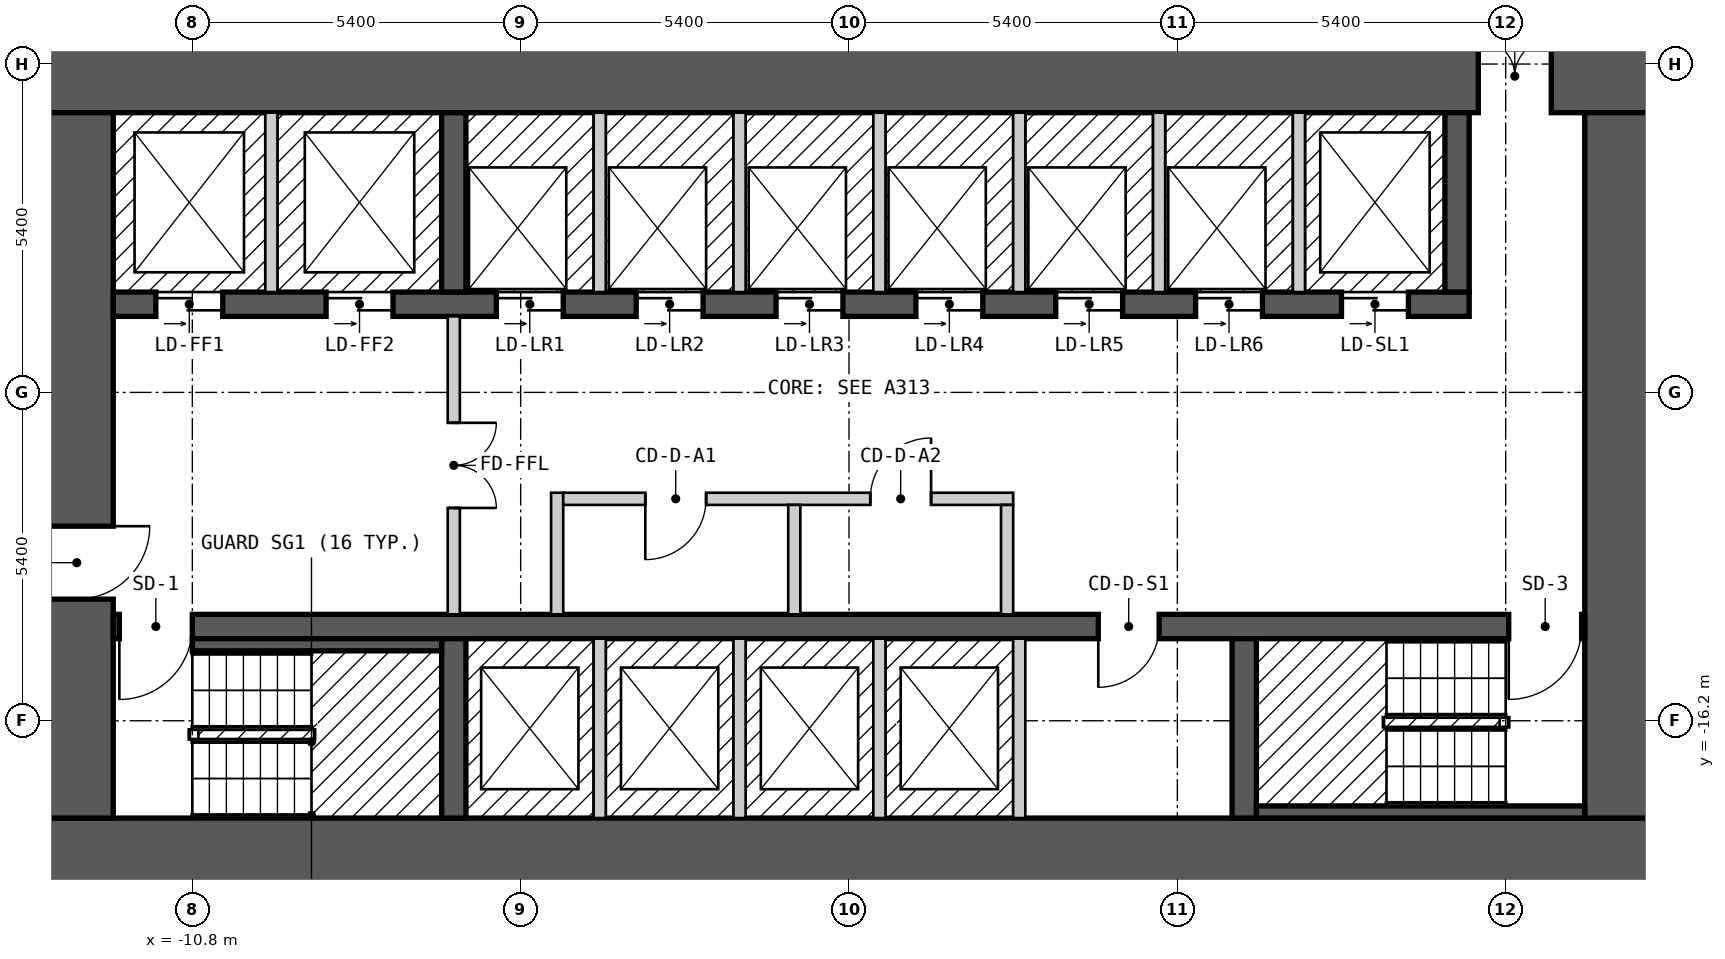
"""IFC4 building model, lengths in metres.
Left out: names, types, materials, properties, quantities, classifications, styles, units other than length and angle.
Written with IfcOpenShell. Run it as: python <this file> out.ifc"""

import sys

from ifc_helpers import new_model, si_unit, direction, frame, frame_2d, origin, place, context, subcontext, project, spatial, rectangle, extrude, element, fill, save


model = new_model("IFC4")
c1 = context("Model", 3, precision=1e-05, world=origin(), true_north=direction((0.0, 1.0)))
c2 = subcontext(c1, "Body", "Model", "MODEL_VIEW")
j1 = project(units=[si_unit("LENGTHUNIT", "METRE"), si_unit("PLANEANGLEUNIT", "RADIAN")], contexts=[c1])
p1 = place(None, origin())
s1 = spatial("IfcSite", under=j1, at=p1, CompositionType="ELEMENT")
p2 = place(p1, origin())
s2 = spatial("IfcBuilding", under=s1, at=p2, CompositionType="ELEMENT")
p3 = place(p2, frame((0.0, 0.0, 38.4)))
s3 = spatial("IfcBuildingStorey", under=s2, at=p3, CompositionType="ELEMENT", Elevation=38.4)
p4 = place(p3, frame((-13.3, -18.4, 0.0), z_axis=(0.0, 0.0, 1.0), x_axis=(1.0, 0.0, 0.0)))
e1 = element("IfcWall", 1, at=p4, inside=s3, PredefinedType="SHEAR", context=c2, shape_type="SweptSolid", body=[
    extrude(rectangle(XDim=26.6, YDim=1.2, at=frame_2d((13.3, 0.0))), origin(), (0.0, 0.0, 1.0), 2.7),
])
p5 = place(p3, frame((-13.3, -5.6, 0.0), z_axis=(0.0, 0.0, 1.0), x_axis=(1.0, 0.0, 0.0)))
e2 = element("IfcWall", 2, at=p5, inside=s3, PredefinedType="SHEAR", context=c2, shape_type="SweptSolid", body=[
    extrude(rectangle(XDim=26.6, YDim=1.2, at=frame_2d((13.3, 0.0))), origin(), (0.0, 0.0, 1.0), 2.7),
])
p6 = place(p5, frame((23.65, 0.0, 0.0)))
e3 = element("IfcOpeningElement", 3, at=p6, cuts=e2, PredefinedType="OPENING", context=c2, shape_type="SweptSolid", body=[
    extrude(rectangle(XDim=1.2, YDim=2.1, at=frame_2d((0.6, 1.05))), frame((0.0, 0.61, 0.0), z_axis=(0.0, -1.0, 0.0), x_axis=(1.0, 0.0, 0.0)), (0.0, 0.0, 1.0), 1.22),
])
p7 = place(p3, frame((-12.7, -17.8, 0.0), z_axis=(0.0, 0.0, 1.0), x_axis=(0.0, 1.0, 0.0)))
e4 = element("IfcWall", 4, at=p7, inside=s3, PredefinedType="SHEAR", context=c2, shape_type="SweptSolid", body=[
    extrude(rectangle(XDim=11.6, YDim=1.2, at=frame_2d((5.8, 0.0))), origin(), (0.0, 0.0, 1.0), 2.7),
])
p8 = place(p7, frame((3.6, 0.0, 0.0)))
e5 = element("IfcOpeningElement", 5, at=p8, cuts=e4, PredefinedType="OPENING", context=c2, shape_type="SweptSolid", body=[
    extrude(rectangle(XDim=1.2, YDim=2.1, at=frame_2d((0.6, 1.05))), frame((0.0, 0.61, 0.0), z_axis=(0.0, -1.0, 0.0), x_axis=(1.0, 0.0, 0.0)), (0.0, 0.0, 1.0), 1.22),
])
p9 = place(p3, frame((12.7, -17.8, 0.0), z_axis=(0.0, 0.0, 1.0), x_axis=(0.0, 1.0, 0.0)))
e6 = element("IfcWall", 6, at=p9, inside=s3, PredefinedType="SHEAR", context=c2, shape_type="SweptSolid", body=[
    extrude(rectangle(XDim=11.6, YDim=1.2, at=frame_2d((5.8, 0.0))), origin(), (0.0, 0.0, 1.0), 2.7),
])
p10 = place(p3, frame((-12.1, -14.65, 0.0), z_axis=(0.0, 0.0, 1.0), x_axis=(1.0, 0.0, 0.0)))
e7 = element("IfcWall", 7, at=p10, inside=s3, PredefinedType="SHEAR", context=c2, shape_type="SweptSolid", body=[
    extrude(rectangle(XDim=24.2, YDim=0.4, at=frame_2d((12.1, 0.0))), origin(), (0.0, 0.0, 1.0), 2.7),
])
p11 = place(p10, frame((1.3, 0.0, 0.0), z_axis=(0.0, 0.0, 1.0), x_axis=(-1.0, 0.0, 0.0)))
e8 = element("IfcOpeningElement", 8, at=p11, cuts=e7, PredefinedType="OPENING", context=c2, shape_type="SweptSolid", body=[
    extrude(rectangle(XDim=1.2, YDim=2.1, at=frame_2d((0.6, 1.05))), frame((0.0, 0.21, 0.0), z_axis=(0.0, -1.0, 0.0), x_axis=(1.0, 0.0, 0.0)), (0.0, 0.0, 1.0), 0.42),
])
p12 = place(p10, frame((24.15, 0.0, 0.0), z_axis=(0.0, 0.0, 1.0), x_axis=(-1.0, 0.0, 0.0)))
e9 = element("IfcOpeningElement", 9, at=p12, cuts=e7, PredefinedType="OPENING", context=c2, shape_type="SweptSolid", body=[
    extrude(rectangle(XDim=1.2, YDim=2.1, at=frame_2d((0.6, 1.05))), frame((0.0, 0.21, 0.0), z_axis=(0.0, -1.0, 0.0), x_axis=(1.0, 0.0, 0.0)), (0.0, 0.0, 1.0), 0.42),
])
p13 = place(p10, frame((17.2, 0.0, 0.0), z_axis=(0.0, 0.0, 1.0), x_axis=(-1.0, 0.0, 0.0)))
e10 = element("IfcOpeningElement", 10, at=p13, cuts=e7, PredefinedType="OPENING", context=c2, shape_type="SweptSolid", body=[
    extrude(rectangle(XDim=1.0, YDim=2.1, at=frame_2d((0.5, 1.05))), frame((0.0, 0.21, 0.0), z_axis=(0.0, -1.0, 0.0), x_axis=(1.0, 0.0, 0.0)), (0.0, 0.0, 1.0), 0.42),
])
p14 = place(p3, frame((-12.1, -9.35, 0.0), z_axis=(0.0, 0.0, 1.0), x_axis=(1.0, 0.0, 0.0)))
e11 = element("IfcWall", 11, at=p14, inside=s3, PredefinedType="SHEAR", context=c2, shape_type="SweptSolid", body=[
    extrude(rectangle(XDim=22.3, YDim=0.4, at=frame_2d((11.15, 0.0))), origin(), (0.0, 0.0, 1.0), 2.7),
])
p15 = place(p14, frame((0.7, 0.0, 0.0)))
e12 = element("IfcOpeningElement", 12, at=p15, cuts=e11, PredefinedType="OPENING", context=c2, shape_type="SweptSolid", body=[
    extrude(rectangle(XDim=1.1, YDim=2.1, at=frame_2d((0.55, 1.05))), frame((0.0, 0.21, 0.0), z_axis=(0.0, -1.0, 0.0), x_axis=(1.0, 0.0, 0.0)), (0.0, 0.0, 1.0), 0.42),
])
p16 = place(p14, frame((3.5, 0.0, 0.0)))
e13 = element("IfcOpeningElement", 13, at=p16, cuts=e11, PredefinedType="OPENING", context=c2, shape_type="SweptSolid", body=[
    extrude(rectangle(XDim=1.1, YDim=2.1, at=frame_2d((0.55, 1.05))), frame((0.0, 0.21, 0.0), z_axis=(0.0, -1.0, 0.0), x_axis=(1.0, 0.0, 0.0)), (0.0, 0.0, 1.0), 0.42),
])
p17 = place(p14, frame((6.3, 0.0, 0.0)))
e14 = element("IfcOpeningElement", 14, at=p17, cuts=e11, PredefinedType="OPENING", context=c2, shape_type="SweptSolid", body=[
    extrude(rectangle(XDim=1.1, YDim=2.1, at=frame_2d((0.55, 1.05))), frame((0.0, 0.21, 0.0), z_axis=(0.0, -1.0, 0.0), x_axis=(1.0, 0.0, 0.0)), (0.0, 0.0, 1.0), 0.42),
])
p18 = place(p14, frame((8.6, 0.0, 0.0)))
e15 = element("IfcOpeningElement", 15, at=p18, cuts=e11, PredefinedType="OPENING", context=c2, shape_type="SweptSolid", body=[
    extrude(rectangle(XDim=1.1, YDim=2.1, at=frame_2d((0.55, 1.05))), frame((0.0, 0.21, 0.0), z_axis=(0.0, -1.0, 0.0), x_axis=(1.0, 0.0, 0.0)), (0.0, 0.0, 1.0), 0.42),
])
p19 = place(p14, frame((10.9, 0.0, 0.0)))
e16 = element("IfcOpeningElement", 16, at=p19, cuts=e11, PredefinedType="OPENING", context=c2, shape_type="SweptSolid", body=[
    extrude(rectangle(XDim=1.1, YDim=2.1, at=frame_2d((0.55, 1.05))), frame((0.0, 0.21, 0.0), z_axis=(0.0, -1.0, 0.0), x_axis=(1.0, 0.0, 0.0)), (0.0, 0.0, 1.0), 0.42),
])
p20 = place(p14, frame((13.2, 0.0, 0.0)))
e17 = element("IfcOpeningElement", 17, at=p20, cuts=e11, PredefinedType="OPENING", context=c2, shape_type="SweptSolid", body=[
    extrude(rectangle(XDim=1.1, YDim=2.1, at=frame_2d((0.55, 1.05))), frame((0.0, 0.21, 0.0), z_axis=(0.0, -1.0, 0.0), x_axis=(1.0, 0.0, 0.0)), (0.0, 0.0, 1.0), 0.42),
])
p21 = place(p14, frame((15.5, 0.0, 0.0)))
e18 = element("IfcOpeningElement", 18, at=p21, cuts=e11, PredefinedType="OPENING", context=c2, shape_type="SweptSolid", body=[
    extrude(rectangle(XDim=1.1, YDim=2.1, at=frame_2d((0.55, 1.05))), frame((0.0, 0.21, 0.0), z_axis=(0.0, -1.0, 0.0), x_axis=(1.0, 0.0, 0.0)), (0.0, 0.0, 1.0), 0.42),
])
p22 = place(p14, frame((17.8, 0.0, 0.0)))
e19 = element("IfcOpeningElement", 19, at=p22, cuts=e11, PredefinedType="OPENING", context=c2, shape_type="SweptSolid", body=[
    extrude(rectangle(XDim=1.1, YDim=2.1, at=frame_2d((0.55, 1.05))), frame((0.0, 0.21, 0.0), z_axis=(0.0, -1.0, 0.0), x_axis=(1.0, 0.0, 0.0)), (0.0, 0.0, 1.0), 0.42),
])
p23 = place(p14, frame((20.2, 0.0, 0.0)))
e20 = element("IfcOpeningElement", 20, at=p23, cuts=e11, PredefinedType="OPENING", context=c2, shape_type="SweptSolid", body=[
    extrude(rectangle(XDim=1.1, YDim=2.1, at=frame_2d((0.55, 1.05))), frame((0.0, 0.21, 0.0), z_axis=(0.0, -1.0, 0.0), x_axis=(1.0, 0.0, 0.0)), (0.0, 0.0, 1.0), 0.42),
])
for number, where, z_axis, x_axis in (
    (21, (-6.5, -17.8, 0.0), (0.0, 0.0, 1.0), (0.0, 1.0, 0.0)),
    (22, (6.5, -17.8, 0.0), (0.0, 0.0, 1.0), (0.0, 1.0, 0.0)),
    (23, (-6.5, -9.15, 0.0), (0.0, 0.0, 1.0), (0.0, 1.0, 0.0)),
    (24, (10.0, -9.15, 0.0), (0.0, 0.0, 1.0), (0.0, 1.0, 0.0)),
):
    element("IfcWall", number, at=place(p3, frame(where, z_axis=z_axis, x_axis=x_axis)), inside=s3, PredefinedType="SHEAR", context=c2, shape_type="SweptSolid", body=[
        extrude(rectangle(XDim=2.95, YDim=0.4, at=frame_2d((1.475, 0.0))), origin(), (0.0, 0.0, 1.0), 2.7),
    ])
p24 = place(p3, frame((-10.8, -14.95, 0.0), z_axis=(0.0, 0.0, 1.0), x_axis=(1.0, 0.0, 0.0)))
e25 = element("IfcWall", 25, at=p24, inside=s3, PredefinedType="SOLIDWALL", context=c2, shape_type="SweptSolid", body=[
    extrude(rectangle(XDim=4.1, YDim=0.2, at=frame_2d((2.05, 0.0))), origin(), (0.0, 0.0, 1.0), 2.7),
])
p25 = place(p3, frame((-9.5, -9.15, 0.0), z_axis=(0.0, 0.0, 1.0), x_axis=(0.0, 1.0, 0.0)))
e26 = element("IfcWall", 26, at=p25, inside=s3, PredefinedType="SOLIDWALL", context=c2, shape_type="SweptSolid", body=[
    extrude(rectangle(XDim=2.95, YDim=0.2, at=frame_2d((1.475, 0.0))), origin(), (0.0, 0.0, 1.0), 2.7),
])
p26 = place(p3, frame((-6.5, -14.45, 0.0), z_axis=(0.0, 0.0, 1.0), x_axis=(0.0, 1.0, 0.0)))
e27 = element("IfcWall", 27, at=p26, inside=s3, PredefinedType="PARTITIONING", context=c2, shape_type="SweptSolid", body=[
    extrude(rectangle(XDim=4.9, YDim=0.2, at=frame_2d((2.45, 0.0))), origin(), (0.0, 0.0, 1.0), 2.7),
])
p27 = place(p26, frame((3.15, 0.0, 0.0), z_axis=(0.0, 0.0, 1.0), x_axis=(-1.0, 0.0, 0.0)))
e28 = element("IfcOpeningElement", 28, at=p27, cuts=e27, PredefinedType="OPENING", context=c2, shape_type="SweptSolid", body=[
    extrude(rectangle(XDim=1.4, YDim=2.1, at=frame_2d((0.7, 1.05))), frame((0.0, 0.11, 0.0), z_axis=(0.0, -1.0, 0.0), x_axis=(1.0, 0.0, 0.0)), (0.0, 0.0, 1.0), 0.22),
])
p28 = place(p3, frame((-4.8, -14.45, 0.0), z_axis=(0.0, 0.0, 1.0), x_axis=(0.0, 1.0, 0.0)))
e29 = element("IfcWall", 29, at=p28, inside=s3, PredefinedType="PARTITIONING", context=c2, shape_type="SweptSolid", body=[
    extrude(rectangle(XDim=2.0, YDim=0.2, at=frame_2d((1.0, 0.0))), origin(), (0.0, 0.0, 1.0), 2.7),
])
p29 = place(p3, frame((-4.7, -12.55, 0.0), z_axis=(0.0, 0.0, 1.0), x_axis=(1.0, 0.0, 0.0)))
e30 = element("IfcWall", 30, at=p29, inside=s3, PredefinedType="PARTITIONING", context=c2, shape_type="SweptSolid", body=[
    extrude(rectangle(XDim=7.4, YDim=0.2, at=frame_2d((3.7, 0.0))), origin(), (0.0, 0.0, 1.0), 2.7),
])
p30 = place(p29, frame((2.35, 0.0, 0.0), z_axis=(0.0, 0.0, 1.0), x_axis=(-1.0, 0.0, 0.0)))
e31 = element("IfcOpeningElement", 31, at=p30, cuts=e30, PredefinedType="OPENING", context=c2, shape_type="SweptSolid", body=[
    extrude(rectangle(XDim=1.0, YDim=2.1, at=frame_2d((0.5, 1.05))), frame((0.0, 0.11, 0.0), z_axis=(0.0, -1.0, 0.0), x_axis=(1.0, 0.0, 0.0)), (0.0, 0.0, 1.0), 0.22),
])
p31 = place(p29, frame((6.05, 0.0, 0.0), z_axis=(0.0, 0.0, 1.0), x_axis=(-1.0, 0.0, 0.0)))
e32 = element("IfcOpeningElement", 32, at=p31, cuts=e30, PredefinedType="OPENING", context=c2, shape_type="SweptSolid", body=[
    extrude(rectangle(XDim=1.0, YDim=2.1, at=frame_2d((0.5, 1.05))), frame((0.0, 0.11, 0.0), z_axis=(0.0, -1.0, 0.0), x_axis=(1.0, 0.0, 0.0)), (0.0, 0.0, 1.0), 0.22),
])
for number, where, z_axis, x_axis in (
    (33, (-4.1, -17.8, 0.0), (0.0, 0.0, 1.0), (0.0, 1.0, 0.0)),
    (34, (-4.1, -9.15, 0.0), (0.0, 0.0, 1.0), (0.0, 1.0, 0.0)),
    (35, (-1.8, -17.8, 0.0), (0.0, 0.0, 1.0), (0.0, 1.0, 0.0)),
    (36, (-1.8, -9.15, 0.0), (0.0, 0.0, 1.0), (0.0, 1.0, 0.0)),
):
    element("IfcWall", number, at=place(p3, frame(where, z_axis=z_axis, x_axis=x_axis)), inside=s3, PredefinedType="SOLIDWALL", context=c2, shape_type="SweptSolid", body=[
        extrude(rectangle(XDim=2.95, YDim=0.2, at=frame_2d((1.475, 0.0))), origin(), (0.0, 0.0, 1.0), 2.7),
    ])
p32 = place(p3, frame((-0.9, -14.45, 0.0), z_axis=(0.0, 0.0, 1.0), x_axis=(0.0, 1.0, 0.0)))
e37 = element("IfcWall", 37, at=p32, inside=s3, PredefinedType="PARTITIONING", context=c2, shape_type="SweptSolid", body=[
    extrude(rectangle(XDim=1.8, YDim=0.2, at=frame_2d((0.9, 0.0))), origin(), (0.0, 0.0, 1.0), 2.7),
])
for number, where, z_axis, x_axis in (
    (38, (0.5, -17.8, 0.0), (0.0, 0.0, 1.0), (0.0, 1.0, 0.0)),
    (39, (0.5, -9.15, 0.0), (0.0, 0.0, 1.0), (0.0, 1.0, 0.0)),
):
    element("IfcWall", number, at=place(p3, frame(where, z_axis=z_axis, x_axis=x_axis)), inside=s3, PredefinedType="SOLIDWALL", context=c2, shape_type="SweptSolid", body=[
        extrude(rectangle(XDim=2.95, YDim=0.2, at=frame_2d((1.475, 0.0))), origin(), (0.0, 0.0, 1.0), 2.7),
    ])
p33 = place(p3, frame((2.6, -14.45, 0.0), z_axis=(0.0, 0.0, 1.0), x_axis=(0.0, 1.0, 0.0)))
e40 = element("IfcWall", 40, at=p33, inside=s3, PredefinedType="PARTITIONING", context=c2, shape_type="SweptSolid", body=[
    extrude(rectangle(XDim=1.8, YDim=0.2, at=frame_2d((0.9, 0.0))), origin(), (0.0, 0.0, 1.0), 2.7),
])
for number, where, z_axis, x_axis in (
    (41, (2.8, -17.8, 0.0), (0.0, 0.0, 1.0), (0.0, 1.0, 0.0)),
    (42, (2.8, -9.15, 0.0), (0.0, 0.0, 1.0), (0.0, 1.0, 0.0)),
    (43, (5.1, -9.15, 0.0), (0.0, 0.0, 1.0), (0.0, 1.0, 0.0)),
):
    element("IfcWall", number, at=place(p3, frame(where, z_axis=z_axis, x_axis=x_axis)), inside=s3, PredefinedType="SOLIDWALL", context=c2, shape_type="SweptSolid", body=[
        extrude(rectangle(XDim=2.95, YDim=0.2, at=frame_2d((1.475, 0.0))), origin(), (0.0, 0.0, 1.0), 2.7),
    ])
p34 = place(p3, frame((6.7, -17.7, 0.0), z_axis=(0.0, 0.0, 1.0), x_axis=(1.0, 0.0, 0.0)))
e44 = element("IfcWall", 44, at=p34, inside=s3, PredefinedType="SOLIDWALL", context=c2, shape_type="SweptSolid", body=[
    extrude(rectangle(XDim=5.4, YDim=0.2, at=frame_2d((2.7, 0.0))), origin(), (0.0, 0.0, 1.0), 2.7),
])
p35 = place(p3, frame((7.4, -9.15, 0.0), z_axis=(0.0, 0.0, 1.0), x_axis=(0.0, 1.0, 0.0)))
e45 = element("IfcWall", 45, at=p35, inside=s3, PredefinedType="SOLIDWALL", context=c2, shape_type="SweptSolid", body=[
    extrude(rectangle(XDim=2.95, YDim=0.2, at=frame_2d((1.475, 0.0))), origin(), (0.0, 0.0, 1.0), 2.7),
])
p36 = place(p15, origin())
e46 = element("IfcDoor", 46, at=p36, inside=s3, OperationType="DOUBLE_DOOR_SLIDING", PredefinedType="DOOR", context=c2, shape_type="SweptSolid", body=[
    extrude(rectangle(XDim=1.1, YDim=2.1, at=frame_2d((0.55, 1.05))), frame((0.0, 0.025, 0.0), z_axis=(0.0, -1.0, 0.0), x_axis=(1.0, 0.0, 0.0)), (0.0, 0.0, 1.0), 0.05),
])
fill(e12, e46)
p37 = place(p16, origin())
e47 = element("IfcDoor", 47, at=p37, inside=s3, OperationType="DOUBLE_DOOR_SLIDING", PredefinedType="DOOR", context=c2, shape_type="SweptSolid", body=[
    extrude(rectangle(XDim=1.1, YDim=2.1, at=frame_2d((0.55, 1.05))), frame((0.0, 0.025, 0.0), z_axis=(0.0, -1.0, 0.0), x_axis=(1.0, 0.0, 0.0)), (0.0, 0.0, 1.0), 0.05),
])
fill(e13, e47)
p38 = place(p17, origin())
e48 = element("IfcDoor", 48, at=p38, inside=s3, OperationType="DOUBLE_DOOR_SLIDING", PredefinedType="DOOR", context=c2, shape_type="SweptSolid", body=[
    extrude(rectangle(XDim=1.1, YDim=2.1, at=frame_2d((0.55, 1.05))), frame((0.0, 0.025, 0.0), z_axis=(0.0, -1.0, 0.0), x_axis=(1.0, 0.0, 0.0)), (0.0, 0.0, 1.0), 0.05),
])
fill(e14, e48)
p39 = place(p18, origin())
e49 = element("IfcDoor", 49, at=p39, inside=s3, OperationType="DOUBLE_DOOR_SLIDING", PredefinedType="DOOR", context=c2, shape_type="SweptSolid", body=[
    extrude(rectangle(XDim=1.1, YDim=2.1, at=frame_2d((0.55, 1.05))), frame((0.0, 0.025, 0.0), z_axis=(0.0, -1.0, 0.0), x_axis=(1.0, 0.0, 0.0)), (0.0, 0.0, 1.0), 0.05),
])
fill(e15, e49)
p40 = place(p19, origin())
e50 = element("IfcDoor", 50, at=p40, inside=s3, OperationType="DOUBLE_DOOR_SLIDING", PredefinedType="DOOR", context=c2, shape_type="SweptSolid", body=[
    extrude(rectangle(XDim=1.1, YDim=2.1, at=frame_2d((0.55, 1.05))), frame((0.0, 0.025, 0.0), z_axis=(0.0, -1.0, 0.0), x_axis=(1.0, 0.0, 0.0)), (0.0, 0.0, 1.0), 0.05),
])
fill(e16, e50)
p41 = place(p20, origin())
e51 = element("IfcDoor", 51, at=p41, inside=s3, OperationType="DOUBLE_DOOR_SLIDING", PredefinedType="DOOR", context=c2, shape_type="SweptSolid", body=[
    extrude(rectangle(XDim=1.1, YDim=2.1, at=frame_2d((0.55, 1.05))), frame((0.0, 0.025, 0.0), z_axis=(0.0, -1.0, 0.0), x_axis=(1.0, 0.0, 0.0)), (0.0, 0.0, 1.0), 0.05),
])
fill(e17, e51)
p42 = place(p21, origin())
e52 = element("IfcDoor", 52, at=p42, inside=s3, OperationType="DOUBLE_DOOR_SLIDING", PredefinedType="DOOR", context=c2, shape_type="SweptSolid", body=[
    extrude(rectangle(XDim=1.1, YDim=2.1, at=frame_2d((0.55, 1.05))), frame((0.0, 0.025, 0.0), z_axis=(0.0, -1.0, 0.0), x_axis=(1.0, 0.0, 0.0)), (0.0, 0.0, 1.0), 0.05),
])
fill(e18, e52)
p43 = place(p22, origin())
e53 = element("IfcDoor", 53, at=p43, inside=s3, OperationType="DOUBLE_DOOR_SLIDING", PredefinedType="DOOR", context=c2, shape_type="SweptSolid", body=[
    extrude(rectangle(XDim=1.1, YDim=2.1, at=frame_2d((0.55, 1.05))), frame((0.0, 0.025, 0.0), z_axis=(0.0, -1.0, 0.0), x_axis=(1.0, 0.0, 0.0)), (0.0, 0.0, 1.0), 0.05),
])
fill(e19, e53)
p44 = place(p23, origin())
e54 = element("IfcDoor", 54, at=p44, inside=s3, OperationType="DOUBLE_DOOR_SLIDING", PredefinedType="DOOR", context=c2, shape_type="SweptSolid", body=[
    extrude(rectangle(XDim=1.1, YDim=2.1, at=frame_2d((0.55, 1.05))), frame((0.0, 0.025, 0.0), z_axis=(0.0, -1.0, 0.0), x_axis=(1.0, 0.0, 0.0)), (0.0, 0.0, 1.0), 0.05),
])
fill(e20, e54)
p45 = place(p11, origin())
e55 = element("IfcDoor", 55, at=p45, inside=s3, OperationType="SINGLE_SWING_RIGHT", PredefinedType="DOOR", context=c2, shape_type="SweptSolid", body=[
    extrude(rectangle(XDim=1.2, YDim=2.1, at=frame_2d((0.6, 1.05))), frame((0.0, 0.025, 0.0), z_axis=(0.0, -1.0, 0.0), x_axis=(1.0, 0.0, 0.0)), (0.0, 0.0, 1.0), 0.05),
])
fill(e8, e55)
p46 = place(p12, origin())
e56 = element("IfcDoor", 56, at=p46, inside=s3, OperationType="SINGLE_SWING_RIGHT", PredefinedType="DOOR", context=c2, shape_type="SweptSolid", body=[
    extrude(rectangle(XDim=1.2, YDim=2.1, at=frame_2d((0.6, 1.05))), frame((0.0, 0.025, 0.0), z_axis=(0.0, -1.0, 0.0), x_axis=(1.0, 0.0, 0.0)), (0.0, 0.0, 1.0), 0.05),
])
fill(e9, e56)
p47 = place(p8, origin())
e57 = element("IfcDoor", 57, at=p47, inside=s3, OperationType="SINGLE_SWING_RIGHT", PredefinedType="DOOR", context=c2, shape_type="SweptSolid", body=[
    extrude(rectangle(XDim=1.2, YDim=2.1, at=frame_2d((0.6, 1.05))), frame((0.0, 0.025, 0.0), z_axis=(0.0, -1.0, 0.0), x_axis=(1.0, 0.0, 0.0)), (0.0, 0.0, 1.0), 0.05),
])
fill(e5, e57)
p48 = place(p27, origin())
e58 = element("IfcDoor", 58, at=p48, inside=s3, OperationType="DOUBLE_DOOR_SINGLE_SWING", PredefinedType="DOOR", context=c2, shape_type="SweptSolid", body=[
    extrude(rectangle(XDim=1.4, YDim=2.1, at=frame_2d((0.7, 1.05))), frame((0.0, 0.025, 0.0), z_axis=(0.0, -1.0, 0.0), x_axis=(1.0, 0.0, 0.0)), (0.0, 0.0, 1.0), 0.05),
])
fill(e28, e58)
p49 = place(p6, origin())
e59 = element("IfcDoor", 59, at=p49, inside=s3, OperationType="DOUBLE_DOOR_SINGLE_SWING", PredefinedType="DOOR", context=c2, shape_type="SweptSolid", body=[
    extrude(rectangle(XDim=1.2, YDim=2.1, at=frame_2d((0.6, 1.05))), frame((0.0, 0.025, 0.0), z_axis=(0.0, -1.0, 0.0), x_axis=(1.0, 0.0, 0.0)), (0.0, 0.0, 1.0), 0.05),
])
fill(e3, e59)
p50 = place(p30, origin())
e60 = element("IfcDoor", 60, at=p50, inside=s3, OperationType="SINGLE_SWING_RIGHT", PredefinedType="DOOR", context=c2, shape_type="SweptSolid", body=[
    extrude(rectangle(XDim=1.0, YDim=2.1, at=frame_2d((0.5, 1.05))), frame((0.0, 0.025, 0.0), z_axis=(0.0, -1.0, 0.0), x_axis=(1.0, 0.0, 0.0)), (0.0, 0.0, 1.0), 0.05),
])
fill(e31, e60)
p51 = place(p31, origin())
e61 = element("IfcDoor", 61, at=p51, inside=s3, OperationType="SINGLE_SWING_LEFT", PredefinedType="DOOR", context=c2, shape_type="SweptSolid", body=[
    extrude(rectangle(XDim=1.0, YDim=2.1, at=frame_2d((0.5, 1.05))), frame((0.0, 0.025, 0.0), z_axis=(0.0, -1.0, 0.0), x_axis=(1.0, 0.0, 0.0)), (0.0, 0.0, 1.0), 0.05),
])
fill(e32, e61)
p52 = place(p13, origin())
e62 = element("IfcDoor", 62, at=p52, inside=s3, OperationType="SINGLE_SWING_RIGHT", PredefinedType="DOOR", context=c2, shape_type="SweptSolid", body=[
    extrude(rectangle(XDim=1.0, YDim=2.1, at=frame_2d((0.5, 1.05))), frame((0.0, 0.025, 0.0), z_axis=(0.0, -1.0, 0.0), x_axis=(1.0, 0.0, 0.0)), (0.0, 0.0, 1.0), 0.05),
])
fill(e10, e62)
save(model, sys.argv[1])
